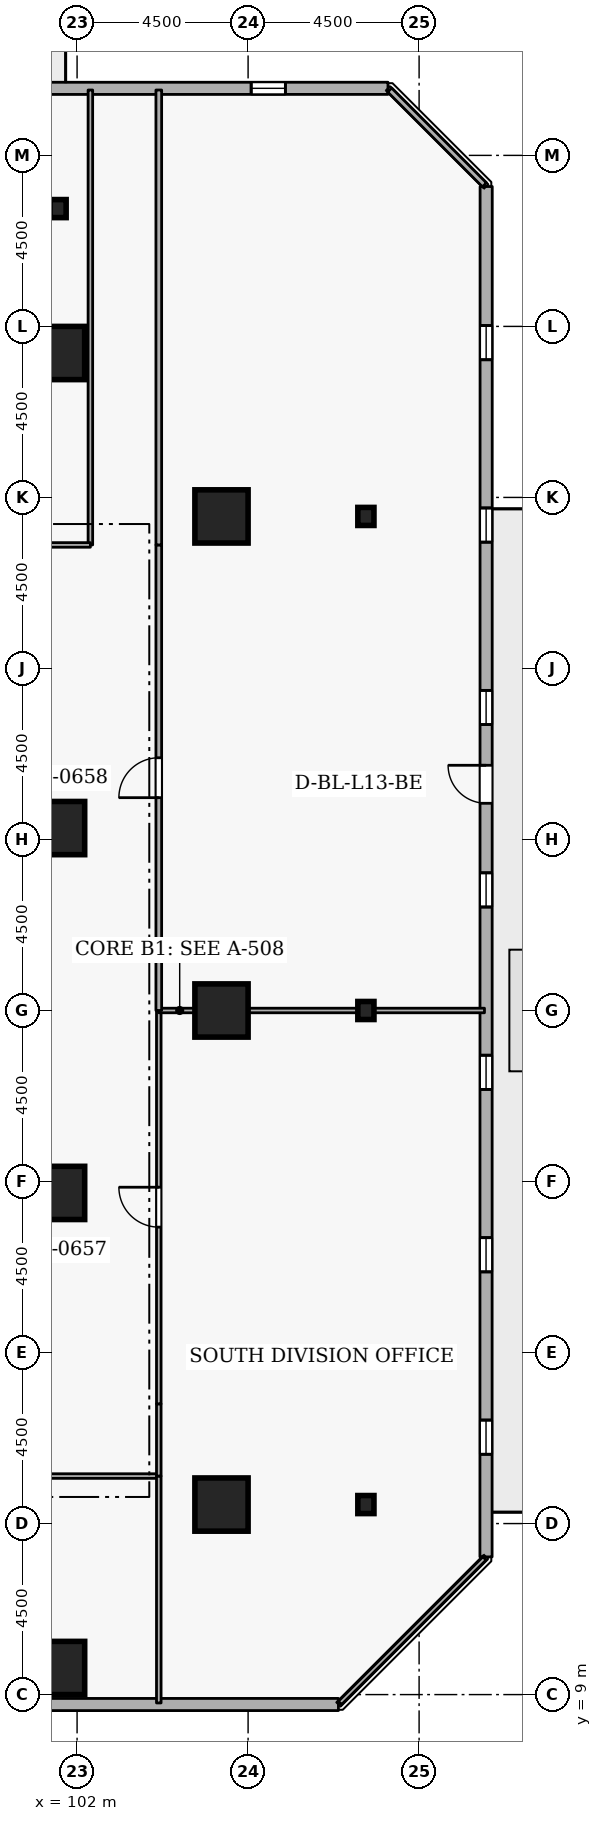
"""IFC4 building model, lengths in metres.
Left out: names, types, materials, properties, quantities, classifications, styles, units other than length and angle.
Written with IfcOpenShell. Run it as: python <this file> out.ifc"""

import sys

from ifc_helpers import new_model, si_unit, direction, frame, frame_2d, origin, origin_2d, place, context, subcontext, project, spatial, rectangle, i_section, extrude, element, fill, save


model = new_model("IFC4")
c1 = context("Model", 3, precision=1e-05, world=origin(), true_north=direction((0.0, 1.0)))
c2 = subcontext(c1, "Body", "Model", "MODEL_VIEW")
j1 = project(units=[si_unit("LENGTHUNIT", "METRE"), si_unit("PLANEANGLEUNIT", "RADIAN")], contexts=[c1])
p1 = place(None, origin())
s1 = spatial("IfcSite", under=j1, at=p1, CompositionType="ELEMENT")
p2 = place(p1, origin())
s2 = spatial("IfcBuilding", under=s1, at=p2, CompositionType="ELEMENT")
p3 = place(p2, frame((0.0, 0.0, 53.7)))
s3 = spatial("IfcBuildingStorey", under=s2, at=p3, CompositionType="ELEMENT", Elevation=53.7)
for number, where, z_axis, x_axis in (
    (1, (105.8, 14.0, 0.0), (0.0, 0.0, 1.0), (1.0, 0.0, 0.0)),
    (2, (105.8, 27.0, 0.0), (0.0, 0.0, 1.0), (1.0, 0.0, 0.0)),
    (3, (105.8, 40.0, 0.0), (0.0, 0.0, 1.0), (1.0, 0.0, 0.0)),
    (4, (101.5, 44.3, 0.0), (0.0, 0.0, 1.0), (1.0, 0.0, 0.0)),
    (5, (101.5, 9.7, 0.0), (0.0, 0.0, 1.0), (1.0, 0.0, 0.0)),
    (6, (101.5, 22.2, 0.0), (0.0, 0.0, 1.0), (1.0, 0.0, 0.0)),
    (7, (101.5, 31.8, 0.0), (0.0, 0.0, 1.0), (1.0, 0.0, 0.0)),
):
    element("IfcColumn", number, at=place(p3, frame(where, z_axis=z_axis, x_axis=x_axis)), inside=s3, PredefinedType="COLUMN", context=c2, shape_type="SweptSolid", body=[
        extrude(rectangle(XDim=1.4, YDim=1.4, at=origin_2d()), origin(), (0.0, 0.0, 1.0), 3.6),
    ])
for number, where, z_axis, x_axis in (
    (8, (109.6, 14.0, 0.0), (0.0, 0.0, 1.0), (1.0, 0.0, 0.0)),
    (9, (109.6, 27.0, 0.0), (0.0, 0.0, 1.0), (1.0, 0.0, 0.0)),
    (10, (109.6, 40.0, 0.0), (0.0, 0.0, 1.0), (1.0, 0.0, 0.0)),
    (11, (101.5, 48.1, 0.0), (0.0, 0.0, 1.0), (1.0, 0.0, 0.0)),
):
    element("IfcColumn", number, at=place(p3, frame(where, z_axis=z_axis, x_axis=x_axis)), inside=s3, PredefinedType="COLUMN", context=c2, shape_type="SweptSolid", body=[
        extrude(i_section(OverallWidth=0.424, OverallDepth=0.475, WebThickness=0.048, FlangeThickness=0.077, FilletRadius=0.015, at=origin_2d()), origin(), (0.0, 0.0, 1.0), 3.6),
    ])
p4 = place(p3, frame((72.819, 8.735, 0.0), z_axis=(0.0, 0.0, 1.0), x_axis=(0.999999992574, 0.000121872777, 0.0)))
e12 = element("IfcWall", 12, at=p4, inside=s3, PredefinedType="STANDARD", context=c2, shape_type="SweptSolid", body=[
    extrude(rectangle(XDim=36.058, YDim=0.32, at=frame_2d((18.029, 0.0))), origin(), (0.0, 0.0, 1.0), 2.7),
])
p5 = place(p4, frame((7.5, 0.0, 0.72)))
e13 = element("IfcOpeningElement", 13, at=p5, cuts=e12, PredefinedType="OPENING", context=c2, shape_type="SweptSolid", body=[
    extrude(rectangle(XDim=0.9, YDim=1.75, at=frame_2d((0.45, 0.875))), frame((0.0, 0.17, 0.0), z_axis=(0.0, -1.0, 0.0), x_axis=(1.0, 0.0, 0.0)), (0.0, 0.0, 1.0), 0.34),
])
p6 = place(p4, frame((12.3, 0.0, 0.72)))
e14 = element("IfcOpeningElement", 14, at=p6, cuts=e12, PredefinedType="OPENING", context=c2, shape_type="SweptSolid", body=[
    extrude(rectangle(XDim=0.9, YDim=1.75, at=frame_2d((0.45, 0.875))), frame((0.0, 0.17, 0.0), z_axis=(0.0, -1.0, 0.0), x_axis=(1.0, 0.0, 0.0)), (0.0, 0.0, 1.0), 0.34),
])
p7 = place(p4, frame((17.1, 0.0, 0.72)))
e15 = element("IfcOpeningElement", 15, at=p7, cuts=e12, PredefinedType="OPENING", context=c2, shape_type="SweptSolid", body=[
    extrude(rectangle(XDim=0.9, YDim=1.75, at=frame_2d((0.45, 0.875))), frame((0.0, 0.17, 0.0), z_axis=(0.0, -1.0, 0.0), x_axis=(1.0, 0.0, 0.0)), (0.0, 0.0, 1.0), 0.34),
])
p8 = place(p4, frame((21.9, 0.0, 0.72)))
e16 = element("IfcOpeningElement", 16, at=p8, cuts=e12, PredefinedType="OPENING", context=c2, shape_type="SweptSolid", body=[
    extrude(rectangle(XDim=0.9, YDim=1.75, at=frame_2d((0.45, 0.875))), frame((0.0, 0.17, 0.0), z_axis=(0.0, -1.0, 0.0), x_axis=(1.0, 0.0, 0.0)), (0.0, 0.0, 1.0), 0.34),
])
p9 = place(p4, frame((26.7, 0.0, 0.72)))
e17 = element("IfcOpeningElement", 17, at=p9, cuts=e12, PredefinedType="OPENING", context=c2, shape_type="SweptSolid", body=[
    extrude(rectangle(XDim=0.9, YDim=1.75, at=frame_2d((0.45, 0.875))), frame((0.0, 0.17, 0.0), z_axis=(0.0, -1.0, 0.0), x_axis=(1.0, 0.0, 0.0)), (0.0, 0.0, 1.0), 0.34),
])
p10 = place(p3, frame((112.76, 12.623, 0.0), z_axis=(0.0, 0.0, 1.0), x_axis=(0.000121872777, 0.999999992574, 0.0)))
e18 = element("IfcWall", 18, at=p10, inside=s3, PredefinedType="STANDARD", context=c2, shape_type="SweptSolid", body=[
    extrude(rectangle(XDim=36.058, YDim=0.32, at=frame_2d((18.029, 0.0))), origin(), (0.0, 0.0, 1.0), 2.7),
])
p11 = place(p10, frame((19.829, 0.0, 0.0)))
e19 = element("IfcOpeningElement", 19, at=p11, cuts=e18, PredefinedType="OPENING", context=c2, shape_type="SweptSolid", body=[
    extrude(rectangle(XDim=1.0, YDim=2.08, at=frame_2d((0.5, 1.04))), frame((0.0, 0.17, 0.0), z_axis=(0.0, -1.0, 0.0), x_axis=(1.0, 0.0, 0.0)), (0.0, 0.0, 1.0), 0.34),
])
p12 = place(p10, frame((2.7, 0.0, 0.72)))
e20 = element("IfcOpeningElement", 20, at=p12, cuts=e18, PredefinedType="OPENING", context=c2, shape_type="SweptSolid", body=[
    extrude(rectangle(XDim=0.9, YDim=1.75, at=frame_2d((0.45, 0.875))), frame((0.0, 0.17, 0.0), z_axis=(0.0, -1.0, 0.0), x_axis=(1.0, 0.0, 0.0)), (0.0, 0.0, 1.0), 0.34),
])
p13 = place(p10, frame((7.5, 0.0, 0.72)))
e21 = element("IfcOpeningElement", 21, at=p13, cuts=e18, PredefinedType="OPENING", context=c2, shape_type="SweptSolid", body=[
    extrude(rectangle(XDim=0.9, YDim=1.75, at=frame_2d((0.45, 0.875))), frame((0.0, 0.17, 0.0), z_axis=(0.0, -1.0, 0.0), x_axis=(1.0, 0.0, 0.0)), (0.0, 0.0, 1.0), 0.34),
])
p14 = place(p10, frame((12.3, 0.0, 0.72)))
e22 = element("IfcOpeningElement", 22, at=p14, cuts=e18, PredefinedType="OPENING", context=c2, shape_type="SweptSolid", body=[
    extrude(rectangle(XDim=0.9, YDim=1.75, at=frame_2d((0.45, 0.875))), frame((0.0, 0.17, 0.0), z_axis=(0.0, -1.0, 0.0), x_axis=(1.0, 0.0, 0.0)), (0.0, 0.0, 1.0), 0.34),
])
p15 = place(p10, frame((17.1, 0.0, 0.72)))
e23 = element("IfcOpeningElement", 23, at=p15, cuts=e18, PredefinedType="OPENING", context=c2, shape_type="SweptSolid", body=[
    extrude(rectangle(XDim=0.9, YDim=1.75, at=frame_2d((0.45, 0.875))), frame((0.0, 0.17, 0.0), z_axis=(0.0, -1.0, 0.0), x_axis=(1.0, 0.0, 0.0)), (0.0, 0.0, 1.0), 0.34),
])
p16 = place(p10, frame((21.9, 0.0, 0.72)))
e24 = element("IfcOpeningElement", 24, at=p16, cuts=e18, PredefinedType="OPENING", context=c2, shape_type="SweptSolid", body=[
    extrude(rectangle(XDim=0.9, YDim=1.75, at=frame_2d((0.45, 0.875))), frame((0.0, 0.17, 0.0), z_axis=(0.0, -1.0, 0.0), x_axis=(1.0, 0.0, 0.0)), (0.0, 0.0, 1.0), 0.34),
])
p17 = place(p10, frame((26.7, 0.0, 0.72)))
e25 = element("IfcOpeningElement", 25, at=p17, cuts=e18, PredefinedType="OPENING", context=c2, shape_type="SweptSolid", body=[
    extrude(rectangle(XDim=0.9, YDim=1.75, at=frame_2d((0.45, 0.875))), frame((0.0, 0.17, 0.0), z_axis=(0.0, -1.0, 0.0), x_axis=(1.0, 0.0, 0.0)), (0.0, 0.0, 1.0), 0.34),
])
p18 = place(p10, frame((31.5, 0.0, 0.72)))
e26 = element("IfcOpeningElement", 26, at=p18, cuts=e18, PredefinedType="OPENING", context=c2, shape_type="SweptSolid", body=[
    extrude(rectangle(XDim=0.9, YDim=1.75, at=frame_2d((0.45, 0.875))), frame((0.0, 0.17, 0.0), z_axis=(0.0, -1.0, 0.0), x_axis=(1.0, 0.0, 0.0)), (0.0, 0.0, 1.0), 0.34),
])
p19 = place(p3, frame((110.181, 51.265, 0.0), z_axis=(0.0, 0.0, 1.0), x_axis=(-0.999999992574, -0.000121872777, 0.0)))
e27 = element("IfcWall", 27, at=p19, inside=s3, PredefinedType="STANDARD", context=c2, shape_type="SweptSolid", body=[
    extrude(rectangle(XDim=36.058, YDim=0.32, at=frame_2d((18.029, 0.0))), origin(), (0.0, 0.0, 1.0), 2.7),
])
p20 = place(p19, frame((19.829, 0.0, 0.0)))
e28 = element("IfcOpeningElement", 28, at=p20, cuts=e27, PredefinedType="OPENING", context=c2, shape_type="SweptSolid", body=[
    extrude(rectangle(XDim=1.0, YDim=2.08, at=frame_2d((0.5, 1.04))), frame((0.0, 0.17, 0.0), z_axis=(0.0, -1.0, 0.0), x_axis=(1.0, 0.0, 0.0)), (0.0, 0.0, 1.0), 0.34),
])
p21 = place(p19, frame((2.7, 0.0, 0.72)))
e29 = element("IfcOpeningElement", 29, at=p21, cuts=e27, PredefinedType="OPENING", context=c2, shape_type="SweptSolid", body=[
    extrude(rectangle(XDim=0.9, YDim=1.75, at=frame_2d((0.45, 0.875))), frame((0.0, 0.17, 0.0), z_axis=(0.0, -1.0, 0.0), x_axis=(1.0, 0.0, 0.0)), (0.0, 0.0, 1.0), 0.34),
])
p22 = place(p19, frame((12.3, 0.0, 0.72)))
e30 = element("IfcOpeningElement", 30, at=p22, cuts=e27, PredefinedType="OPENING", context=c2, shape_type="SweptSolid", body=[
    extrude(rectangle(XDim=0.9, YDim=1.75, at=frame_2d((0.45, 0.875))), frame((0.0, 0.17, 0.0), z_axis=(0.0, -1.0, 0.0), x_axis=(1.0, 0.0, 0.0)), (0.0, 0.0, 1.0), 0.34),
])
p23 = place(p19, frame((17.1, 0.0, 0.72)))
e31 = element("IfcOpeningElement", 31, at=p23, cuts=e27, PredefinedType="OPENING", context=c2, shape_type="SweptSolid", body=[
    extrude(rectangle(XDim=0.9, YDim=1.75, at=frame_2d((0.45, 0.875))), frame((0.0, 0.17, 0.0), z_axis=(0.0, -1.0, 0.0), x_axis=(1.0, 0.0, 0.0)), (0.0, 0.0, 1.0), 0.34),
])
p24 = place(p19, frame((26.7, 0.0, 0.72)))
e32 = element("IfcOpeningElement", 32, at=p24, cuts=e27, PredefinedType="OPENING", context=c2, shape_type="SweptSolid", body=[
    extrude(rectangle(XDim=0.9, YDim=1.75, at=frame_2d((0.45, 0.875))), frame((0.0, 0.17, 0.0), z_axis=(0.0, -1.0, 0.0), x_axis=(1.0, 0.0, 0.0)), (0.0, 0.0, 1.0), 0.34),
])
p25 = place(p19, frame((31.5, 0.0, 0.72)))
e33 = element("IfcOpeningElement", 33, at=p25, cuts=e27, PredefinedType="OPENING", context=c2, shape_type="SweptSolid", body=[
    extrude(rectangle(XDim=0.9, YDim=1.75, at=frame_2d((0.45, 0.875))), frame((0.0, 0.17, 0.0), z_axis=(0.0, -1.0, 0.0), x_axis=(1.0, 0.0, 0.0)), (0.0, 0.0, 1.0), 0.34),
])
p26 = place(p3, frame((94.8, 14.75, 0.0), z_axis=(0.0, 0.0, 1.0), x_axis=(1.0, 0.0, 0.0)))
e34 = element("IfcWall", 34, at=p26, inside=s3, PredefinedType="PARTITIONING", context=c2, shape_type="SweptSolid", body=[
    extrude(rectangle(XDim=9.35, YDim=0.12, at=frame_2d((4.675, 0.0))), origin(), (0.0, 0.0, 1.0), 3.34),
])
p27 = place(p26, frame((4.15, 0.0, 0.0)))
e35 = element("IfcOpeningElement", 35, at=p27, cuts=e34, PredefinedType="OPENING", context=c2, shape_type="SweptSolid", body=[
    extrude(rectangle(XDim=1.05, YDim=2.1, at=frame_2d((0.525, 1.05))), frame((0.0, 0.07, 0.0), z_axis=(0.0, -1.0, 0.0), x_axis=(1.0, 0.0, 0.0)), (0.0, 0.0, 1.0), 0.14),
])
p28 = place(p3, frame((104.15, 14.75, 0.0), z_axis=(0.0, 0.0, 1.0), x_axis=(0.0, -1.0, 0.0)))
e36 = element("IfcWall", 36, at=p28, inside=s3, PredefinedType="PARTITIONING", context=c2, shape_type="SweptSolid", body=[
    extrude(rectangle(XDim=5.97, YDim=0.12, at=frame_2d((2.985, 0.0))), origin(), (0.0, 0.0, 1.0), 3.34),
])
p29 = place(p3, frame((102.35, 51.22, 0.0), z_axis=(0.0, 0.0, 1.0), x_axis=(0.0, -1.0, 0.0)))
e37 = element("IfcWall", 37, at=p29, inside=s3, PredefinedType="PARTITIONING", context=c2, shape_type="SweptSolid", body=[
    extrude(rectangle(XDim=11.97, YDim=0.12, at=frame_2d((5.985, 0.0))), origin(), (0.0, 0.0, 1.0), 3.34),
])
p30 = place(p3, frame((102.35, 39.25, 0.0), z_axis=(0.0, 0.0, 1.0), x_axis=(-1.0, 0.0, 0.0)))
e38 = element("IfcWall", 38, at=p30, inside=s3, PredefinedType="PARTITIONING", context=c2, shape_type="SweptSolid", body=[
    extrude(rectangle(XDim=1.862, YDim=0.12, at=frame_2d((0.931, 0.0))), origin(), (0.0, 0.0, 1.0), 3.34),
])
p31 = place(p3, frame((104.15, 14.75, 0.0), z_axis=(0.0, 0.0, 1.0), x_axis=(0.0, 1.0, 0.0)))
e39 = element("IfcWall", 39, at=p31, inside=s3, PredefinedType="PARTITIONING", context=c2, shape_type="SweptSolid", body=[
    extrude(rectangle(XDim=1.9, YDim=0.12, at=frame_2d((0.95, 0.0))), origin(), (0.0, 0.0, 1.0), 3.34),
])
p32 = place(p3, frame((104.15, 16.65, 0.0), z_axis=(0.0, 0.0, 1.0), x_axis=(0.0, 1.0, 0.0)))
e40 = element("IfcWall", 40, at=p32, inside=s3, PredefinedType="PARTITIONING", context=c2, shape_type="SweptSolid", body=[
    extrude(rectangle(XDim=10.35, YDim=0.12, at=frame_2d((5.175, 0.0))), origin(), (0.0, 0.0, 1.0), 3.34),
])
p33 = place(p32, frame((4.65, 0.0, 0.0)))
e41 = element("IfcOpeningElement", 41, at=p33, cuts=e40, PredefinedType="OPENING", context=c2, shape_type="SweptSolid", body=[
    extrude(rectangle(XDim=1.05, YDim=2.1, at=frame_2d((0.525, 1.05))), frame((0.0, 0.07, 0.0), z_axis=(0.0, -1.0, 0.0), x_axis=(1.0, 0.0, 0.0)), (0.0, 0.0, 1.0), 0.14),
])
p34 = place(p3, frame((104.15, 27.0, 0.0), z_axis=(0.0, 0.0, 1.0), x_axis=(1.0, 0.0, 0.0)))
e42 = element("IfcWall", 42, at=p34, inside=s3, PredefinedType="PARTITIONING", context=c2, shape_type="SweptSolid", body=[
    extrude(rectangle(XDim=8.57, YDim=0.12, at=frame_2d((4.285, 0.0))), origin(), (0.0, 0.0, 1.0), 2.932),
])
p35 = place(p3, frame((112.72, 12.583, 0.0), z_axis=(0.0, 0.0, 1.0), x_axis=(-0.707106781187, -0.707106781187, 0.0)))
e43 = element("IfcWall", 43, at=p35, inside=s3, PredefinedType="PARTITIONING", context=c2, shape_type="SweptSolid", body=[
    extrude(rectangle(XDim=5.379, YDim=0.12, at=frame_2d((2.689, 0.0))), origin(), (0.0, 0.0, 1.0), 3.34),
])
p36 = place(p3, frame((104.15, 27.0, 0.0), z_axis=(0.0, 0.0, 1.0), x_axis=(0.0, 1.0, 0.0)))
e44 = element("IfcWall", 44, at=p36, inside=s3, PredefinedType="PARTITIONING", context=c2, shape_type="SweptSolid", body=[
    extrude(rectangle(XDim=12.25, YDim=0.15, at=frame_2d((6.125, 0.0))), origin(), (0.0, 0.0, 1.0), 3.34),
])
p37 = place(p36, frame((5.6, 0.0, 0.0)))
e45 = element("IfcOpeningElement", 45, at=p37, cuts=e44, PredefinedType="OPENING", context=c2, shape_type="SweptSolid", body=[
    extrude(rectangle(XDim=1.05, YDim=2.1, at=frame_2d((0.525, 1.05))), frame((0.0, 0.085, 0.0), z_axis=(0.0, -1.0, 0.0), x_axis=(1.0, 0.0, 0.0)), (0.0, 0.0, 1.0), 0.17),
])
p38 = place(p3, frame((104.15, 39.25, 0.0), z_axis=(0.0, 0.0, 1.0), x_axis=(0.0, 1.0, 0.0)))
e46 = element("IfcWall", 46, at=p38, inside=s3, PredefinedType="PARTITIONING", context=c2, shape_type="SweptSolid", body=[
    extrude(rectangle(XDim=11.97, YDim=0.15, at=frame_2d((5.985, 0.0))), origin(), (0.0, 0.0, 1.0), 3.34),
])
p39 = place(p3, frame((110.225, 51.22, 0.0), z_axis=(0.0, 0.0, 1.0), x_axis=(0.707106781187, -0.707106781187, 0.0)))
e47 = element("IfcWall", 47, at=p39, inside=s3, PredefinedType="PARTITIONING", context=c2, shape_type="SweptSolid", body=[
    extrude(rectangle(XDim=3.528, YDim=0.15, at=frame_2d((1.764, 0.0))), origin(), (0.0, 0.0, 1.0), 3.34),
])
p40 = place(p11, origin())
e48 = element("IfcDoor", 48, at=p40, inside=s3, OperationType="SINGLE_SWING_RIGHT", PredefinedType="DOOR", context=c2, shape_type="SweptSolid", body=[
    extrude(rectangle(XDim=1.0, YDim=2.08, at=frame_2d((0.5, 1.04))), frame((0.0, 0.025, 0.0), z_axis=(0.0, -1.0, 0.0), x_axis=(1.0, 0.0, 0.0)), (0.0, 0.0, 1.0), 0.05),
])
fill(e19, e48)
p41 = place(p12, origin())
e49 = element("IfcWindow", 49, at=p41, inside=s3, PartitioningType="SINGLE_PANEL", PredefinedType="WINDOW", context=c2, shape_type="SweptSolid", body=[
    extrude(rectangle(XDim=0.9, YDim=1.75, at=frame_2d((0.45, 0.875))), frame((0.0, 0.03, 0.0), z_axis=(0.0, -1.0, 0.0), x_axis=(1.0, 0.0, 0.0)), (0.0, 0.0, 1.0), 0.06),
])
fill(e20, e49)
p42 = place(p13, origin())
e50 = element("IfcWindow", 50, at=p42, inside=s3, PartitioningType="SINGLE_PANEL", PredefinedType="WINDOW", context=c2, shape_type="SweptSolid", body=[
    extrude(rectangle(XDim=0.9, YDim=1.75, at=frame_2d((0.45, 0.875))), frame((0.0, 0.03, 0.0), z_axis=(0.0, -1.0, 0.0), x_axis=(1.0, 0.0, 0.0)), (0.0, 0.0, 1.0), 0.06),
])
fill(e21, e50)
p43 = place(p14, origin())
e51 = element("IfcWindow", 51, at=p43, inside=s3, PartitioningType="SINGLE_PANEL", PredefinedType="WINDOW", context=c2, shape_type="SweptSolid", body=[
    extrude(rectangle(XDim=0.9, YDim=1.75, at=frame_2d((0.45, 0.875))), frame((0.0, 0.03, 0.0), z_axis=(0.0, -1.0, 0.0), x_axis=(1.0, 0.0, 0.0)), (0.0, 0.0, 1.0), 0.06),
])
fill(e22, e51)
p44 = place(p15, origin())
e52 = element("IfcWindow", 52, at=p44, inside=s3, PartitioningType="SINGLE_PANEL", PredefinedType="WINDOW", context=c2, shape_type="SweptSolid", body=[
    extrude(rectangle(XDim=0.9, YDim=1.75, at=frame_2d((0.45, 0.875))), frame((0.0, 0.03, 0.0), z_axis=(0.0, -1.0, 0.0), x_axis=(1.0, 0.0, 0.0)), (0.0, 0.0, 1.0), 0.06),
])
fill(e23, e52)
p45 = place(p16, origin())
e53 = element("IfcWindow", 53, at=p45, inside=s3, PartitioningType="SINGLE_PANEL", PredefinedType="WINDOW", context=c2, shape_type="SweptSolid", body=[
    extrude(rectangle(XDim=0.9, YDim=1.75, at=frame_2d((0.45, 0.875))), frame((0.0, 0.03, 0.0), z_axis=(0.0, -1.0, 0.0), x_axis=(1.0, 0.0, 0.0)), (0.0, 0.0, 1.0), 0.06),
])
fill(e24, e53)
p46 = place(p17, origin())
e54 = element("IfcWindow", 54, at=p46, inside=s3, PartitioningType="SINGLE_PANEL", PredefinedType="WINDOW", context=c2, shape_type="SweptSolid", body=[
    extrude(rectangle(XDim=0.9, YDim=1.75, at=frame_2d((0.45, 0.875))), frame((0.0, 0.03, 0.0), z_axis=(0.0, -1.0, 0.0), x_axis=(1.0, 0.0, 0.0)), (0.0, 0.0, 1.0), 0.06),
])
fill(e25, e54)
p47 = place(p18, origin())
e55 = element("IfcWindow", 55, at=p47, inside=s3, PartitioningType="SINGLE_PANEL", PredefinedType="WINDOW", context=c2, shape_type="SweptSolid", body=[
    extrude(rectangle(XDim=0.9, YDim=1.75, at=frame_2d((0.45, 0.875))), frame((0.0, 0.03, 0.0), z_axis=(0.0, -1.0, 0.0), x_axis=(1.0, 0.0, 0.0)), (0.0, 0.0, 1.0), 0.06),
])
fill(e26, e55)
p48 = place(p21, origin())
e56 = element("IfcWindow", 56, at=p48, inside=s3, PartitioningType="SINGLE_PANEL", PredefinedType="WINDOW", context=c2, shape_type="SweptSolid", body=[
    extrude(rectangle(XDim=0.9, YDim=1.75, at=frame_2d((0.45, 0.875))), frame((0.0, 0.03, 0.0), z_axis=(0.0, -1.0, 0.0), x_axis=(1.0, 0.0, 0.0)), (0.0, 0.0, 1.0), 0.06),
])
fill(e29, e56)
p49 = place(p33, origin())
e57 = element("IfcDoor", 57, at=p49, inside=s3, OperationType="SINGLE_SWING_RIGHT", PredefinedType="DOOR", context=c2, shape_type="SweptSolid", body=[
    extrude(rectangle(XDim=1.05, YDim=2.1, at=frame_2d((0.525, 1.05))), frame((0.0, 0.025, 0.0), z_axis=(0.0, -1.0, 0.0), x_axis=(1.0, 0.0, 0.0)), (0.0, 0.0, 1.0), 0.05),
])
fill(e41, e57)
p50 = place(p37, origin())
e58 = element("IfcDoor", 58, at=p50, inside=s3, OperationType="SINGLE_SWING_LEFT", PredefinedType="DOOR", context=c2, shape_type="SweptSolid", body=[
    extrude(rectangle(XDim=1.05, YDim=2.1, at=frame_2d((0.525, 1.05))), frame((0.0, 0.025, 0.0), z_axis=(0.0, -1.0, 0.0), x_axis=(1.0, 0.0, 0.0)), (0.0, 0.0, 1.0), 0.05),
])
fill(e45, e58)
save(model, sys.argv[1])
